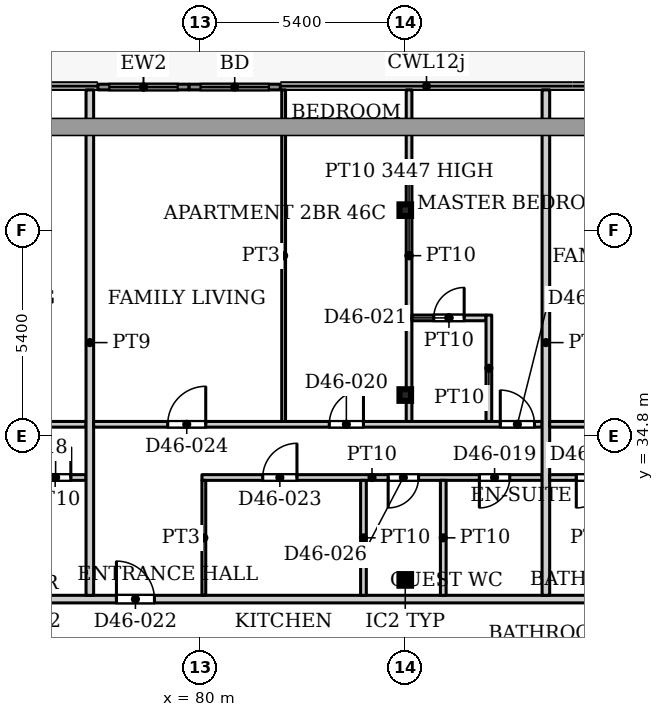
"""IFC4 building model, lengths in metres.
Left out: names, types, materials, properties, quantities, classifications, styles, units other than length and angle.
Written with IfcOpenShell. Run it as: python <this file> out.ifc"""

import sys

from ifc_helpers import new_model, si_unit, direction, frame, frame_2d, origin, origin_2d, place, context, subcontext, project, spatial, rectangle, hollow_rectangle, extrude, source, transform, mapped, element, fill, save


model = new_model("IFC4")
c1 = context("Model", 3, precision=1e-05, world=origin(), true_north=direction((0.0, 1.0)))
c2 = subcontext(c1, "Body", "Model", "MODEL_VIEW")
j1 = project(units=[si_unit("LENGTHUNIT", "METRE"), si_unit("PLANEANGLEUNIT", "RADIAN")], contexts=[c1])
p1 = place(None, origin())
s1 = spatial("IfcSite", under=j1, at=p1, CompositionType="ELEMENT")
p2 = place(p1, origin())
s2 = spatial("IfcBuilding", under=s1, at=p2, CompositionType="ELEMENT")
p3 = place(p2, frame((0.0, 0.0, 195.5)))
s3 = spatial("IfcBuildingStorey", under=s2, at=p3, CompositionType="ELEMENT", Elevation=195.5)
for number, where, z_axis, x_axis in (
    (1, (85.4, 31.005, 0.0), (0.0, 0.0, 1.0), (1.0, 0.0, 0.0)),
    (2, (85.4, 35.87, 0.0), (0.0, 0.0, 1.0), (1.0, 0.0, 0.0)),
    (3, (85.4, 40.735, 0.0), (0.0, 0.0, 1.0), (1.0, 0.0, 0.0)),
):
    element("IfcColumn", number, at=place(p3, frame(where, z_axis=z_axis, x_axis=x_axis)), inside=s3, PredefinedType="COLUMN", context=c2, shape_type="SweptSolid", body=[
        extrude(hollow_rectangle(XDim=0.305, YDim=0.305, WallThickness=0.016, InnerFilletRadius=0.016, OuterFilletRadius=0.032, at=origin_2d()), origin(), (0.0, 0.0, 1.0), 3.9),
    ])
p4 = place(p3, frame((77.312, 43.975, 0.0), z_axis=(0.0, 0.0, 1.0), x_axis=(1.0, 0.0, 0.0)))
e4 = element("IfcWall", 4, at=p4, inside=s3, PredefinedType="SOLIDWALL", context=c2, shape_type="SweptSolid", body=[
    extrude(rectangle(XDim=2.4, YDim=0.15, at=frame_2d((1.2, 0.0))), origin(), (0.0, 0.0, 1.0), 3.75),
])
p5 = place(p4, frame((0.3, 0.0, 0.0)))
e5 = element("IfcOpeningElement", 5, at=p5, cuts=e4, PredefinedType="OPENING", context=c2, shape_type="SweptSolid", body=[
    extrude(rectangle(XDim=1.8, YDim=2.4, at=frame_2d((0.9, 1.2))), frame((0.0, 0.085, 0.0), z_axis=(0.0, -1.0, 0.0), x_axis=(1.0, 0.0, 0.0)), (0.0, 0.0, 1.0), 0.17),
])
p6 = place(p3, frame((79.712, 43.975, 0.0), z_axis=(0.0, 0.0, 1.0), x_axis=(1.0, 0.0, 0.0)))
e6 = element("IfcWall", 6, at=p6, inside=s3, PredefinedType="SOLIDWALL", context=c2, shape_type="SweptSolid", body=[
    extrude(rectangle(XDim=2.4, YDim=0.15, at=frame_2d((1.2, 0.0))), origin(), (0.0, 0.0, 1.0), 3.75),
])
p7 = place(p6, frame((0.3, 0.0, 0.0)))
e7 = element("IfcOpeningElement", 7, at=p7, cuts=e6, PredefinedType="OPENING", context=c2, shape_type="SweptSolid", body=[
    extrude(rectangle(XDim=1.8, YDim=2.4, at=frame_2d((0.9, 1.2))), frame((0.0, 0.085, 0.0), z_axis=(0.0, -1.0, 0.0), x_axis=(1.0, 0.0, 0.0)), (0.0, 0.0, 1.0), 0.17),
])
p8 = place(p3, frame((53.549, 30.5, 0.0), z_axis=(0.0, 0.0, 1.0), x_axis=(1.0, 0.0, 0.0)))
e8 = element("IfcWall", 8, at=p8, inside=s3, PredefinedType="PARTITIONING", context=c2, shape_type="SweptSolid", body=[
    extrude(rectangle(XDim=44.551, YDim=0.2, at=frame_2d((22.275, 0.0))), origin(), (0.0, 0.0, 1.0), 3.6),
])
p9 = place(p8, frame((5.501, 0.0, 0.0)))
e9 = element("IfcOpeningElement", 9, at=p9, cuts=e8, PredefinedType="OPENING", context=c2, shape_type="SweptSolid", body=[
    extrude(rectangle(XDim=1.0, YDim=2.1, at=frame_2d((0.5, 1.05))), frame((0.0, 0.11, 0.0), z_axis=(0.0, -1.0, 0.0), x_axis=(1.0, 0.0, 0.0)), (0.0, 0.0, 1.0), 0.22),
])
p10 = place(p8, frame((20.201, 0.0, 0.0)))
e10 = element("IfcOpeningElement", 10, at=p10, cuts=e8, PredefinedType="OPENING", context=c2, shape_type="SweptSolid", body=[
    extrude(rectangle(XDim=1.0, YDim=2.1, at=frame_2d((0.5, 1.05))), frame((0.0, 0.11, 0.0), z_axis=(0.0, -1.0, 0.0), x_axis=(1.0, 0.0, 0.0)), (0.0, 0.0, 1.0), 0.22),
])
p11 = place(p8, frame((24.251, 0.0, 0.0)))
e11 = element("IfcOpeningElement", 11, at=p11, cuts=e8, PredefinedType="OPENING", context=c2, shape_type="SweptSolid", body=[
    extrude(rectangle(XDim=1.0, YDim=2.1, at=frame_2d((0.5, 1.05))), frame((0.0, 0.11, 0.0), z_axis=(0.0, -1.0, 0.0), x_axis=(1.0, 0.0, 0.0)), (0.0, 0.0, 1.0), 0.22),
])
p12 = place(p8, frame((40.151, 0.0, 0.0)))
e12 = element("IfcOpeningElement", 12, at=p12, cuts=e8, PredefinedType="OPENING", context=c2, shape_type="SweptSolid", body=[
    extrude(rectangle(XDim=1.0, YDim=2.1, at=frame_2d((0.5, 1.05))), frame((0.0, 0.11, 0.0), z_axis=(0.0, -1.0, 0.0), x_axis=(1.0, 0.0, 0.0)), (0.0, 0.0, 1.0), 0.22),
])
p13 = place(p3, frame((67.3, 35.1, 0.0), z_axis=(0.0, 0.0, 1.0), x_axis=(1.0, 0.0, 0.0)))
e13 = element("IfcWall", 13, at=p13, inside=s3, PredefinedType="PARTITIONING", context=c2, shape_type="SweptSolid", body=[
    extrude(rectangle(XDim=9.7, YDim=0.15, at=frame_2d((4.85, 0.0))), origin(), (0.0, 0.0, 1.0), 3.6),
])
p14 = place(p13, frame((1.0, 0.0, 0.0)))
e14 = element("IfcOpeningElement", 14, at=p14, cuts=e13, PredefinedType="OPENING", context=c2, shape_type="SweptSolid", body=[
    extrude(rectangle(XDim=0.9, YDim=2.1, at=frame_2d((0.45, 1.05))), frame((0.0, 0.085, 0.0), z_axis=(0.0, -1.0, 0.0), x_axis=(1.0, 0.0, 0.0)), (0.0, 0.0, 1.0), 0.17),
])
p15 = place(p13, frame((6.3, 0.0, 0.0)))
e15 = element("IfcOpeningElement", 15, at=p15, cuts=e13, PredefinedType="OPENING", context=c2, shape_type="SweptSolid", body=[
    extrude(rectangle(XDim=1.0, YDim=2.1, at=frame_2d((0.5, 1.05))), frame((0.0, 0.085, 0.0), z_axis=(0.0, -1.0, 0.0), x_axis=(1.0, 0.0, 0.0)), (0.0, 0.0, 1.0), 0.17),
])
p16 = place(p3, frame((75.375, 33.7, 0.0), z_axis=(0.0, 0.0, 1.0), x_axis=(1.0, 0.0, 0.0)))
e16 = element("IfcWall", 16, at=p16, inside=s3, PredefinedType="PARTITIONING", context=c2, shape_type="SweptSolid", body=[
    extrude(rectangle(XDim=1.625, YDim=0.15, at=frame_2d((0.812, 0.0))), origin(), (0.0, 0.0, 1.0), 3.6),
])
p17 = place(p16, frame((0.425, 0.0, 0.0)))
e17 = element("IfcOpeningElement", 17, at=p17, cuts=e16, PredefinedType="OPENING", context=c2, shape_type="SweptSolid", body=[
    extrude(rectangle(XDim=0.8, YDim=2.1, at=frame_2d((0.4, 1.05))), frame((0.0, 0.085, 0.0), z_axis=(0.0, -1.0, 0.0), x_axis=(1.0, 0.0, 0.0)), (0.0, 0.0, 1.0), 0.17),
])
p18 = place(p3, frame((77.1, 30.6, 0.0), z_axis=(0.0, 0.0, 1.0), x_axis=(0.0, 1.0, 0.0)))
e18 = element("IfcWall", 18, at=p18, inside=s3, PredefinedType="PARTITIONING", context=c2, shape_type="SweptSolid", body=[
    extrude(rectangle(XDim=13.3, YDim=0.2, at=frame_2d((6.65, 0.0))), origin(), (0.0, 0.0, 1.0), 3.6),
])
p19 = place(p3, frame((77.2, 35.1, 0.0), z_axis=(0.0, 0.0, 1.0), x_axis=(1.0, 0.0, 0.0)))
e19 = element("IfcWall", 19, at=p19, inside=s3, PredefinedType="PARTITIONING", context=c2, shape_type="SweptSolid", body=[
    extrude(rectangle(XDim=11.8, YDim=0.15, at=frame_2d((5.9, 0.0))), origin(), (0.0, 0.0, 1.0), 3.6),
])
p20 = place(p19, frame((6.2, 0.0, 0.0)))
e20 = element("IfcOpeningElement", 20, at=p20, cuts=e19, PredefinedType="OPENING", context=c2, shape_type="SweptSolid", body=[
    extrude(rectangle(XDim=0.9, YDim=2.1, at=frame_2d((0.45, 1.05))), frame((0.0, 0.085, 0.0), z_axis=(0.0, -1.0, 0.0), x_axis=(1.0, 0.0, 0.0)), (0.0, 0.0, 1.0), 0.17),
])
p21 = place(p19, frame((1.95, 0.0, 0.0)))
e21 = element("IfcOpeningElement", 21, at=p21, cuts=e19, PredefinedType="OPENING", context=c2, shape_type="SweptSolid", body=[
    extrude(rectangle(XDim=1.0, YDim=2.1, at=frame_2d((0.5, 1.05))), frame((0.0, 0.085, 0.0), z_axis=(0.0, -1.0, 0.0), x_axis=(1.0, 0.0, 0.0)), (0.0, 0.0, 1.0), 0.17),
])
p22 = place(p19, frame((10.7, 0.0, 0.0)))
e22 = element("IfcOpeningElement", 22, at=p22, cuts=e19, PredefinedType="OPENING", context=c2, shape_type="SweptSolid", body=[
    extrude(rectangle(XDim=0.9, YDim=2.1, at=frame_2d((0.45, 1.05))), frame((0.0, 0.085, 0.0), z_axis=(0.0, -1.0, 0.0), x_axis=(1.0, 0.0, 0.0)), (0.0, 0.0, 1.0), 0.17),
])
p23 = place(p3, frame((80.05, 33.7, 0.0), z_axis=(0.0, 0.0, 1.0), x_axis=(1.0, 0.0, 0.0)))
e23 = element("IfcWall", 23, at=p23, inside=s3, PredefinedType="PARTITIONING", context=c2, shape_type="SweptSolid", body=[
    extrude(rectangle(XDim=8.95, YDim=0.15, at=frame_2d((4.475, 0.0))), origin(), (0.0, 0.0, 1.0), 3.6),
])
p24 = place(p23, frame((7.3, 0.0, 0.0)))
e24 = element("IfcOpeningElement", 24, at=p24, cuts=e23, PredefinedType="OPENING", context=c2, shape_type="SweptSolid", body=[
    extrude(rectangle(XDim=0.8, YDim=2.1, at=frame_2d((0.4, 1.05))), frame((0.0, 0.085, 0.0), z_axis=(0.0, -1.0, 0.0), x_axis=(1.0, 0.0, 0.0)), (0.0, 0.0, 1.0), 0.17),
])
p25 = place(p23, frame((1.6, 0.0, 0.0)))
e25 = element("IfcOpeningElement", 25, at=p25, cuts=e23, PredefinedType="OPENING", context=c2, shape_type="SweptSolid", body=[
    extrude(rectangle(XDim=0.9, YDim=2.1, at=frame_2d((0.45, 1.05))), frame((0.0, 0.085, 0.0), z_axis=(0.0, -1.0, 0.0), x_axis=(1.0, 0.0, 0.0)), (0.0, 0.0, 1.0), 0.17),
])
p26 = place(p23, frame((4.9, 0.0, 0.0)))
e26 = element("IfcOpeningElement", 26, at=p26, cuts=e23, PredefinedType="OPENING", context=c2, shape_type="SweptSolid", body=[
    extrude(rectangle(XDim=0.8, YDim=2.1, at=frame_2d((0.4, 1.05))), frame((0.0, 0.085, 0.0), z_axis=(0.0, -1.0, 0.0), x_axis=(1.0, 0.0, 0.0)), (0.0, 0.0, 1.0), 0.17),
])
p27 = place(p3, frame((80.1, 30.6, 0.0), z_axis=(0.0, 0.0, 1.0), x_axis=(0.0, 1.0, 0.0)))
e27 = element("IfcWall", 27, at=p27, inside=s3, PredefinedType="PARTITIONING", context=c2, shape_type="SweptSolid", body=[
    extrude(rectangle(XDim=3.025, YDim=0.1, at=frame_2d((1.512, 0.0))), origin(), (0.0, 0.0, 1.0), 3.6),
])
p28 = place(p3, frame((82.2, 35.175, 0.0), z_axis=(0.0, 0.0, 1.0), x_axis=(0.0, 1.0, 0.0)))
e28 = element("IfcWall", 28, at=p28, inside=s3, PredefinedType="PARTITIONING", context=c2, shape_type="SweptSolid", body=[
    extrude(rectangle(XDim=8.725, YDim=0.1, at=frame_2d((4.362, 0.0))), origin(), (0.0, 0.0, 1.0), 3.6),
])
p29 = place(p3, frame((84.3, 30.6, 0.0), z_axis=(0.0, 0.0, 1.0), x_axis=(0.0, 1.0, 0.0)))
e29 = element("IfcWall", 29, at=p29, inside=s3, PredefinedType="PARTITIONING", context=c2, shape_type="SweptSolid", body=[
    extrude(rectangle(XDim=3.025, YDim=0.15, at=frame_2d((1.512, 0.0))), origin(), (0.0, 0.0, 1.0), 3.6),
])
p30 = place(p3, frame((85.5, 35.175, 0.0), z_axis=(0.0, 0.0, 1.0), x_axis=(0.0, 1.0, 0.0)))
e30 = element("IfcWall", 30, at=p30, inside=s3, PredefinedType="PARTITIONING", context=c2, shape_type="SweptSolid", body=[
    extrude(rectangle(XDim=8.725, YDim=0.15, at=frame_2d((4.362, 0.0))), origin(), (0.0, 0.0, 1.0), 3.447),
])
p31 = place(p3, frame((85.575, 37.9, 0.0), z_axis=(0.0, 0.0, 1.0), x_axis=(1.0, 0.0, 0.0)))
e31 = element("IfcWall", 31, at=p31, inside=s3, PredefinedType="PARTITIONING", context=c2, shape_type="SweptSolid", body=[
    extrude(rectangle(XDim=1.95, YDim=0.15, at=frame_2d((0.975, 0.0))), origin(), (0.0, 0.0, 1.0), 3.6),
])
p32 = place(p31, frame((0.575, 0.0, 0.0)))
e32 = element("IfcOpeningElement", 32, at=p32, cuts=e31, PredefinedType="OPENING", context=c2, shape_type="SweptSolid", body=[
    extrude(rectangle(XDim=0.8, YDim=2.1, at=frame_2d((0.4, 1.05))), frame((0.0, 0.085, 0.0), z_axis=(0.0, -1.0, 0.0), x_axis=(1.0, 0.0, 0.0)), (0.0, 0.0, 1.0), 0.17),
])
p33 = place(p3, frame((86.4, 30.6, 0.0), z_axis=(0.0, 0.0, 1.0), x_axis=(0.0, 1.0, 0.0)))
e33 = element("IfcWall", 33, at=p33, inside=s3, PredefinedType="PARTITIONING", context=c2, shape_type="SweptSolid", body=[
    extrude(rectangle(XDim=3.025, YDim=0.15, at=frame_2d((1.512, 0.0))), origin(), (0.0, 0.0, 1.0), 3.6),
])
p34 = place(p3, frame((87.6, 35.175, 0.0), z_axis=(0.0, 0.0, 1.0), x_axis=(0.0, 1.0, 0.0)))
e34 = element("IfcWall", 34, at=p34, inside=s3, PredefinedType="PARTITIONING", context=c2, shape_type="SweptSolid", body=[
    extrude(rectangle(XDim=2.8, YDim=0.15, at=frame_2d((1.4, 0.0))), origin(), (0.0, 0.0, 1.0), 3.6),
])
p35 = place(p3, frame((89.1, 30.6, 0.0), z_axis=(0.0, 0.0, 1.0), x_axis=(0.0, 1.0, 0.0)))
e35 = element("IfcWall", 35, at=p35, inside=s3, PredefinedType="PARTITIONING", context=c2, shape_type="SweptSolid", body=[
    extrude(rectangle(XDim=13.3, YDim=0.2, at=frame_2d((6.65, 0.0))), origin(), (0.0, 0.0, 1.0), 3.6),
])
p36 = place(p3, frame((89.2, 33.7, 0.0), z_axis=(0.0, 0.0, 1.0), x_axis=(1.0, 0.0, 0.0)))
e36 = element("IfcWall", 36, at=p36, inside=s3, PredefinedType="PARTITIONING", context=c2, shape_type="SweptSolid", body=[
    extrude(rectangle(XDim=4.15, YDim=0.15, at=frame_2d((2.075, 0.0))), origin(), (0.0, 0.0, 1.0), 3.6),
])
p37 = place(p36, frame((0.7, 0.0, 0.0)))
e37 = element("IfcOpeningElement", 37, at=p37, cuts=e36, PredefinedType="OPENING", context=c2, shape_type="SweptSolid", body=[
    extrude(rectangle(XDim=0.8, YDim=2.1, at=frame_2d((0.4, 1.05))), frame((0.0, 0.085, 0.0), z_axis=(0.0, -1.0, 0.0), x_axis=(1.0, 0.0, 0.0)), (0.0, 0.0, 1.0), 0.17),
])
p38 = place(p36, frame((2.8, 0.0, 0.0)))
e38 = element("IfcOpeningElement", 38, at=p38, cuts=e36, PredefinedType="OPENING", context=c2, shape_type="SweptSolid", body=[
    extrude(rectangle(XDim=0.8, YDim=2.1, at=frame_2d((0.4, 1.05))), frame((0.0, 0.085, 0.0), z_axis=(0.0, -1.0, 0.0), x_axis=(1.0, 0.0, 0.0)), (0.0, 0.0, 1.0), 0.17),
])
p39 = place(p3, frame((89.2, 35.1, 0.0), z_axis=(0.0, 0.0, 1.0), x_axis=(1.0, 0.0, 0.0)))
e39 = element("IfcWall", 39, at=p39, inside=s3, PredefinedType="PARTITIONING", context=c2, shape_type="SweptSolid", body=[
    extrude(rectangle(XDim=10.7, YDim=0.15, at=frame_2d((5.35, 0.0))), origin(), (0.0, 0.0, 1.0), 3.6),
])
p40 = place(p39, frame((9.05, 0.0, 0.0)))
e40 = element("IfcOpeningElement", 40, at=p40, cuts=e39, PredefinedType="OPENING", context=c2, shape_type="SweptSolid", body=[
    extrude(rectangle(XDim=0.9, YDim=2.1, at=frame_2d((0.45, 1.05))), frame((0.0, 0.085, 0.0), z_axis=(0.0, -1.0, 0.0), x_axis=(1.0, 0.0, 0.0)), (0.0, 0.0, 1.0), 0.17),
])
p41 = place(p39, frame((1.65, 0.0, 0.0)))
e41 = element("IfcOpeningElement", 41, at=p41, cuts=e39, PredefinedType="OPENING", context=c2, shape_type="SweptSolid", body=[
    extrude(rectangle(XDim=1.0, YDim=2.1, at=frame_2d((0.5, 1.05))), frame((0.0, 0.085, 0.0), z_axis=(0.0, -1.0, 0.0), x_axis=(1.0, 0.0, 0.0)), (0.0, 0.0, 1.0), 0.17),
])
p42 = place(p39, frame((6.95, 0.0, 0.0)))
e42 = element("IfcOpeningElement", 42, at=p42, cuts=e39, PredefinedType="OPENING", context=c2, shape_type="SweptSolid", body=[
    extrude(rectangle(XDim=0.9, YDim=2.1, at=frame_2d((0.45, 1.05))), frame((0.0, 0.085, 0.0), z_axis=(0.0, -1.0, 0.0), x_axis=(1.0, 0.0, 0.0)), (0.0, 0.0, 1.0), 0.17),
])
m1 = source(origin(), c2, "Body", "SweptSolid", [
    extrude(rectangle(XDim=1.8, YDim=2.4, at=frame_2d((0.9, 1.2))), frame((0.0, 0.025, 0.0), z_axis=(0.0, -1.0, 0.0), x_axis=(1.0, 0.0, 0.0)), (0.0, 0.0, 1.0), 0.05),
])
p43 = place(p5, origin())
e43 = element("IfcDoor", 43, at=p43, inside=s3, OperationType="SLIDING_TO_LEFT", PredefinedType="DOOR", context=c2, shape_type="MappedRepresentation", body=[
    mapped(m1, transform((0.0, 0.0, 0.0), x_axis=(1.0, 0.0, 0.0), y_axis=(0.0, 1.0, 0.0), z_axis=(0.0, 0.0, 1.0), scale=1.0)),
])
fill(e5, e43)
p44 = place(p7, origin())
e44 = element("IfcDoor", 44, at=p44, inside=s3, OperationType="SLIDING_TO_LEFT", PredefinedType="DOOR", context=c2, shape_type="MappedRepresentation", body=[
    mapped(m1, transform((0.0, 0.0, 0.0), x_axis=(1.0, 0.0, 0.0), y_axis=(0.0, 1.0, 0.0), z_axis=(0.0, 0.0, 1.0), scale=1.0)),
])
fill(e7, e44)
m2 = source(origin(), c2, "Body", "SweptSolid", [
    extrude(rectangle(XDim=0.8, YDim=2.1, at=frame_2d((0.4, 1.05))), frame((0.0, 0.025, 0.0), z_axis=(0.0, -1.0, 0.0), x_axis=(1.0, 0.0, 0.0)), (0.0, 0.0, 1.0), 0.05),
])
p45 = place(p17, origin())
e45 = element("IfcDoor", 45, at=p45, inside=s3, OperationType="SINGLE_SWING_LEFT", PredefinedType="DOOR", context=c2, shape_type="MappedRepresentation", body=[
    mapped(m2, transform((0.0, 0.0, 0.0), x_axis=(1.0, 0.0, 0.0), y_axis=(0.0, 1.0, 0.0), z_axis=(0.0, 0.0, 1.0), scale=1.0)),
])
fill(e17, e45)
p46 = place(p24, origin())
e46 = element("IfcDoor", 46, at=p46, inside=s3, OperationType="SINGLE_SWING_RIGHT", PredefinedType="DOOR", context=c2, shape_type="MappedRepresentation", body=[
    mapped(m2, transform((0.0, 0.0, 0.0), x_axis=(1.0, 0.0, 0.0), y_axis=(0.0, 1.0, 0.0), z_axis=(0.0, 0.0, 1.0), scale=1.0)),
])
fill(e24, e46)
m3 = source(origin(), c2, "Body", "SweptSolid", [
    extrude(rectangle(XDim=0.9, YDim=2.1, at=frame_2d((0.45, 1.05))), frame((0.0, 0.025, 0.0), z_axis=(0.0, -1.0, 0.0), x_axis=(1.0, 0.0, 0.0)), (0.0, 0.0, 1.0), 0.05),
])
p47 = place(p20, origin())
e47 = element("IfcDoor", 47, at=p47, inside=s3, OperationType="SINGLE_SWING_LEFT", PredefinedType="DOOR", context=c2, shape_type="MappedRepresentation", body=[
    mapped(m3, transform((0.0, 0.0, 0.0), x_axis=(1.0, 0.0, 0.0), y_axis=(0.0, 1.0, 0.0), z_axis=(0.0, 0.0, 1.0), scale=1.0)),
])
fill(e20, e47)
p48 = place(p32, origin())
e48 = element("IfcDoor", 48, at=p48, inside=s3, OperationType="SINGLE_SWING_LEFT", PredefinedType="DOOR", context=c2, shape_type="MappedRepresentation", body=[
    mapped(m2, transform((0.0, 0.0, 0.0), x_axis=(1.0, 0.0, 0.0), y_axis=(0.0, 1.0, 0.0), z_axis=(0.0, 0.0, 1.0), scale=1.0)),
])
fill(e32, e48)
m4 = source(origin(), c2, "Body", "SweptSolid", [
    extrude(rectangle(XDim=1.0, YDim=2.1, at=frame_2d((0.5, 1.05))), frame((0.0, 0.025, 0.0), z_axis=(0.0, -1.0, 0.0), x_axis=(1.0, 0.0, 0.0)), (0.0, 0.0, 1.0), 0.05),
])
p49 = place(p11, origin())
e49 = element("IfcDoor", 49, at=p49, inside=s3, OperationType="SINGLE_SWING_LEFT", PredefinedType="DOOR", context=c2, shape_type="MappedRepresentation", body=[
    mapped(m4, transform((0.0, 0.0, 0.0), x_axis=(1.0, 0.0, 0.0), y_axis=(0.0, 1.0, 0.0), z_axis=(0.0, 0.0, 1.0), scale=1.0)),
])
fill(e11, e49)
p50 = place(p25, origin())
e50 = element("IfcDoor", 50, at=p50, inside=s3, OperationType="SINGLE_SWING_LEFT", PredefinedType="DOOR", context=c2, shape_type="MappedRepresentation", body=[
    mapped(m3, transform((0.0, 0.0, 0.0), x_axis=(1.0, 0.0, 0.0), y_axis=(0.0, 1.0, 0.0), z_axis=(0.0, 0.0, 1.0), scale=1.0)),
])
fill(e25, e50)
m5 = source(origin(), c2, "Body", "SweptSolid", [
    extrude(rectangle(XDim=1.0, YDim=2.1, at=frame_2d((0.5, 1.05))), frame((0.0, 0.025, 0.0), z_axis=(0.0, -1.0, 0.0), x_axis=(1.0, 0.0, 0.0)), (0.0, 0.0, 1.0), 0.05),
])
p51 = place(p21, origin())
e51 = element("IfcDoor", 51, at=p51, inside=s3, OperationType="SINGLE_SWING_LEFT", PredefinedType="DOOR", context=c2, shape_type="MappedRepresentation", body=[
    mapped(m5, transform((0.0, 0.0, 0.0), x_axis=(1.0, 0.0, 0.0), y_axis=(0.0, 1.0, 0.0), z_axis=(0.0, 0.0, 1.0), scale=1.0)),
])
fill(e21, e51)
p52 = place(p22, origin())
e52 = element("IfcDoor", 52, at=p52, inside=s3, OperationType="SINGLE_SWING_LEFT", PredefinedType="DOOR", context=c2, shape_type="MappedRepresentation", body=[
    mapped(m3, transform((0.0, 0.0, 0.0), x_axis=(1.0, 0.0, 0.0), y_axis=(0.0, 1.0, 0.0), z_axis=(0.0, 0.0, 1.0), scale=1.0)),
])
fill(e22, e52)
p53 = place(p26, origin())
e53 = element("IfcDoor", 53, at=p53, inside=s3, OperationType="SINGLE_SWING_RIGHT", PredefinedType="DOOR", context=c2, shape_type="MappedRepresentation", body=[
    mapped(m2, transform((0.0, 0.0, 0.0), x_axis=(1.0, 0.0, 0.0), y_axis=(0.0, 1.0, 0.0), z_axis=(0.0, 0.0, 1.0), scale=1.0)),
])
fill(e26, e53)
p54 = place(p37, origin())
e54 = element("IfcDoor", 54, at=p54, inside=s3, OperationType="SINGLE_SWING_RIGHT", PredefinedType="DOOR", context=c2, shape_type="MappedRepresentation", body=[
    mapped(m2, transform((0.0, 0.0, 0.0), x_axis=(1.0, 0.0, 0.0), y_axis=(0.0, 1.0, 0.0), z_axis=(0.0, 0.0, 1.0), scale=1.0)),
])
fill(e37, e54)
save(model, sys.argv[1])
